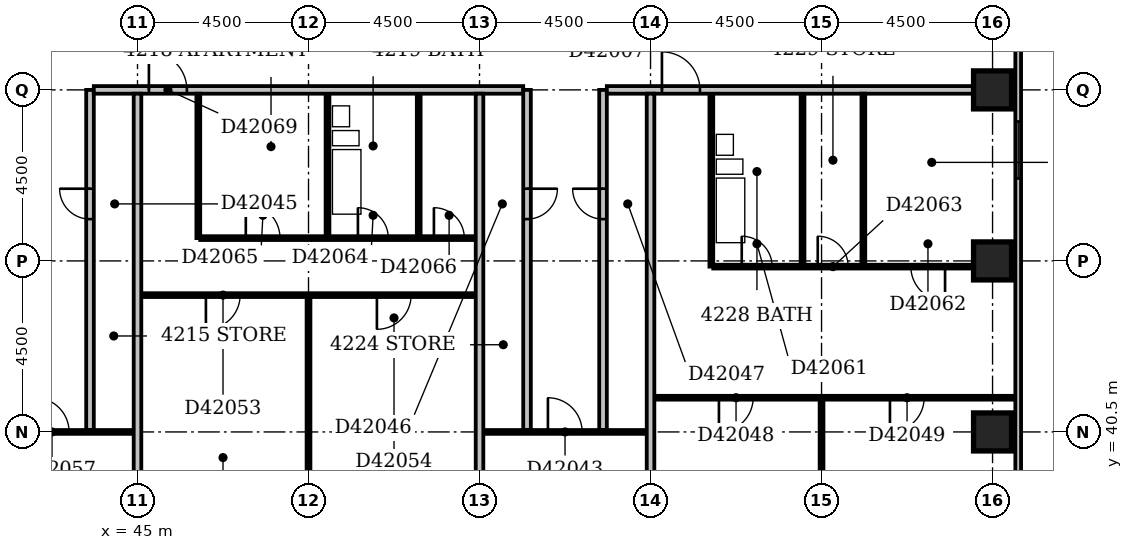
"""IFC4 building model, lengths in metres.
Left out: names, types, materials, properties, quantities, classifications, styles, units other than length and angle.
Written with IfcOpenShell. Run it as: python <this file> out.ifc"""

import sys

from ifc_helpers import new_model, si_unit, direction, frame, frame_2d, origin, origin_2d, place, context, subcontext, project, spatial, rectangle, extrude, element, fill, save


model = new_model("IFC4")
c1 = context("Model", 3, precision=1e-05, world=origin(), true_north=direction((0.0, 1.0)))
c2 = subcontext(c1, "Body", "Model", "MODEL_VIEW")
j1 = project(units=[si_unit("LENGTHUNIT", "METRE"), si_unit("PLANEANGLEUNIT", "RADIAN")], contexts=[c1])
p1 = place(None, origin())
s1 = spatial("IfcSite", under=j1, at=p1, CompositionType="ELEMENT")
p2 = place(p1, origin())
s2 = spatial("IfcBuilding", under=s1, at=p2, CompositionType="ELEMENT")
p3 = place(p2, frame((0.0, 0.0, 166.4)))
s3 = spatial("IfcBuildingStorey", under=s2, at=p3, CompositionType="ELEMENT", Elevation=166.4)
for number, where, z_axis, x_axis in (
    (1, (67.5, 40.5, -0.3), (0.0, 0.0, 1.0), (1.0, 0.0, 0.0)),
    (2, (67.5, 45.0, -0.3), (0.0, 0.0, 1.0), (1.0, 0.0, 0.0)),
    (3, (67.5, 49.5, -0.3), (0.0, 0.0, 1.0), (1.0, 0.0, 0.0)),
):
    element("IfcColumn", number, at=place(p3, frame(where, z_axis=z_axis, x_axis=x_axis)), inside=s3, PredefinedType="COLUMN", context=c2, shape_type="SweptSolid", body=[
        extrude(rectangle(XDim=1.0, YDim=1.0, at=origin_2d()), origin(), (0.0, 0.0, 1.0), 3.6),
    ])
p4 = place(p3, frame((68.175, 35.4, 0.0), z_axis=(0.0, 0.0, 1.0), x_axis=(0.0, 1.0, 0.0)))
e4 = element("IfcWall", 4, at=p4, inside=s3, PredefinedType="STANDARD", context=c2, shape_type="SweptSolid", body=[
    extrude(rectangle(XDim=23.85, YDim=0.15, at=frame_2d((11.925, 0.0))), origin(), (0.0, 0.0, 1.0), 2.7),
])
p5 = place(p4, frame((1.65, 0.0, 0.6)))
e5 = element("IfcOpeningElement", 5, at=p5, cuts=e4, PredefinedType="OPENING", context=c2, shape_type="SweptSolid", body=[
    extrude(rectangle(XDim=2.4, YDim=1.8, at=frame_2d((1.2, 0.9))), frame((0.0, 0.087, 0.0), z_axis=(0.0, -1.0, 0.0), x_axis=(1.0, 0.0, 0.0)), (0.0, 0.0, 1.0), 0.174),
])
p6 = place(p4, frame((11.769, 0.0, 0.6)))
e6 = element("IfcOpeningElement", 6, at=p6, cuts=e4, PredefinedType="OPENING", context=c2, shape_type="SweptSolid", body=[
    extrude(rectangle(XDim=1.5, YDim=1.8, at=frame_2d((0.75, 0.9))), frame((0.0, 0.087, 0.0), z_axis=(0.0, -1.0, 0.0), x_axis=(1.0, 0.0, 0.0)), (0.0, 0.0, 1.0), 0.174),
])
p7 = place(p4, frame((19.65, 0.0, 0.6)))
e7 = element("IfcOpeningElement", 7, at=p7, cuts=e4, PredefinedType="OPENING", context=c2, shape_type="SweptSolid", body=[
    extrude(rectangle(XDim=2.4, YDim=1.8, at=frame_2d((1.2, 0.9))), frame((0.0, 0.087, 0.0), z_axis=(0.0, -1.0, 0.0), x_axis=(1.0, 0.0, 0.0)), (0.0, 0.0, 1.0), 0.174),
])
p8 = place(p3, frame((45.0, 36.5, 0.0), z_axis=(0.0, 0.0, 1.0), x_axis=(0.0, 1.0, 0.0)))
e8 = element("IfcWall", 8, at=p8, inside=s3, PredefinedType="PARTITIONING", context=c2, shape_type="SweptSolid", body=[
    extrude(rectangle(XDim=12.9, YDim=0.2, at=frame_2d((6.45, 0.0))), origin(), (0.0, 0.0, 1.0), 2.6),
])
p9 = place(p3, frame((49.5, 36.5, 0.0), z_axis=(0.0, 0.0, 1.0), x_axis=(0.0, 1.0, 0.0)))
e9 = element("IfcWall", 9, at=p9, inside=s3, PredefinedType="PARTITIONING", context=c2, shape_type="SweptSolid", body=[
    extrude(rectangle(XDim=7.55, YDim=0.1, at=frame_2d((3.775, 0.0))), origin(), (0.0, 0.0, 1.0), 3.3),
])
p10 = place(p3, frame((54.0, 36.5, 0.0), z_axis=(0.0, 0.0, 1.0), x_axis=(0.0, 1.0, 0.0)))
e10 = element("IfcWall", 10, at=p10, inside=s3, PredefinedType="PARTITIONING", context=c2, shape_type="SweptSolid", body=[
    extrude(rectangle(XDim=12.9, YDim=0.2, at=frame_2d((6.45, 0.0))), origin(), (0.0, 0.0, 1.0), 2.6),
])
p11 = place(p3, frame((58.5, 36.5, 0.0), z_axis=(0.0, 0.0, 1.0), x_axis=(0.0, 1.0, 0.0)))
e11 = element("IfcWall", 11, at=p11, inside=s3, PredefinedType="PARTITIONING", context=c2, shape_type="SweptSolid", body=[
    extrude(rectangle(XDim=12.9, YDim=0.2, at=frame_2d((6.45, 0.0))), origin(), (0.0, 0.0, 1.0), 3.3),
])
p12 = place(p3, frame((63.0, 36.5, 0.0), z_axis=(0.0, 0.0, 1.0), x_axis=(0.0, 1.0, 0.0)))
e12 = element("IfcWall", 12, at=p12, inside=s3, PredefinedType="PARTITIONING", context=c2, shape_type="SweptSolid", body=[
    extrude(rectangle(XDim=4.85, YDim=0.1, at=frame_2d((2.425, 0.0))), origin(), (0.0, 0.0, 1.0), 2.4),
])
p13 = place(p3, frame((40.6, 40.5, 0.0), z_axis=(0.0, 0.0, 1.0), x_axis=(1.0, 0.0, 0.0)))
e13 = element("IfcWall", 13, at=p13, inside=s3, PredefinedType="PARTITIONING", context=c2, shape_type="SweptSolid", body=[
    extrude(rectangle(XDim=4.3, YDim=0.1, at=frame_2d((2.15, 0.0))), origin(), (0.0, 0.0, 1.0), 3.3),
])
p14 = place(p13, frame((1.7, 0.0, 0.0)))
e14 = element("IfcOpeningElement", 14, at=p14, cuts=e13, PredefinedType="OPENING", context=c2, shape_type="SweptSolid", body=[
    extrude(rectangle(XDim=0.9, YDim=2.1, at=frame_2d((0.45, 1.05))), frame((0.0, 0.062, 0.0), z_axis=(0.0, -1.0, 0.0), x_axis=(1.0, 0.0, 0.0)), (0.0, 0.0, 1.0), 0.124),
])
p15 = place(p3, frame((54.1, 40.5, 0.0), z_axis=(0.0, 0.0, 1.0), x_axis=(1.0, 0.0, 0.0)))
e15 = element("IfcWall", 15, at=p15, inside=s3, PredefinedType="PARTITIONING", context=c2, shape_type="SweptSolid", body=[
    extrude(rectangle(XDim=4.3, YDim=0.1, at=frame_2d((2.15, 0.0))), origin(), (0.0, 0.0, 1.0), 3.3),
])
p16 = place(p15, frame((1.7, 0.0, 0.0)))
e16 = element("IfcOpeningElement", 16, at=p16, cuts=e15, PredefinedType="OPENING", context=c2, shape_type="SweptSolid", body=[
    extrude(rectangle(XDim=0.9, YDim=2.1, at=frame_2d((0.45, 1.05))), frame((0.0, 0.062, 0.0), z_axis=(0.0, -1.0, 0.0), x_axis=(1.0, 0.0, 0.0)), (0.0, 0.0, 1.0), 0.124),
])
p17 = place(p3, frame((43.75, 40.55, 0.0), z_axis=(0.0, 0.0, 1.0), x_axis=(0.0, 1.0, 0.0)))
e17 = element("IfcWall", 17, at=p17, inside=s3, PredefinedType="PARTITIONING", context=c2, shape_type="SweptSolid", body=[
    extrude(rectangle(XDim=8.95, YDim=0.2, at=frame_2d((4.475, 0.0))), origin(), (0.0, 0.0, 1.0), 3.3),
])
p18 = place(p17, frame((5.55, 0.0, 0.0)))
e18 = element("IfcOpeningElement", 18, at=p18, cuts=e17, PredefinedType="OPENING", context=c2, shape_type="SweptSolid", body=[
    extrude(rectangle(XDim=0.8, YDim=2.1, at=frame_2d((0.4, 1.05))), frame((0.0, 0.112, 0.0), z_axis=(0.0, -1.0, 0.0), x_axis=(1.0, 0.0, 0.0)), (0.0, 0.0, 1.0), 0.224),
])
p19 = place(p3, frame((55.25, 40.55, 0.0), z_axis=(0.0, 0.0, 1.0), x_axis=(0.0, 1.0, 0.0)))
e19 = element("IfcWall", 19, at=p19, inside=s3, PredefinedType="PARTITIONING", context=c2, shape_type="SweptSolid", body=[
    extrude(rectangle(XDim=8.95, YDim=0.2, at=frame_2d((4.475, 0.0))), origin(), (0.0, 0.0, 1.0), 3.3),
])
p20 = place(p19, frame((5.55, 0.0, 0.0)))
e20 = element("IfcOpeningElement", 20, at=p20, cuts=e19, PredefinedType="OPENING", context=c2, shape_type="SweptSolid", body=[
    extrude(rectangle(XDim=0.8, YDim=2.1, at=frame_2d((0.4, 1.05))), frame((0.0, 0.112, 0.0), z_axis=(0.0, -1.0, 0.0), x_axis=(1.0, 0.0, 0.0)), (0.0, 0.0, 1.0), 0.224),
])
p21 = place(p3, frame((57.25, 40.55, 0.0), z_axis=(0.0, 0.0, 1.0), x_axis=(0.0, 1.0, 0.0)))
e21 = element("IfcWall", 21, at=p21, inside=s3, PredefinedType="PARTITIONING", context=c2, shape_type="SweptSolid", body=[
    extrude(rectangle(XDim=8.95, YDim=0.2, at=frame_2d((4.475, 0.0))), origin(), (0.0, 0.0, 1.0), 3.3),
])
p22 = place(p21, frame((5.55, 0.0, 0.0)))
e22 = element("IfcOpeningElement", 22, at=p22, cuts=e21, PredefinedType="OPENING", context=c2, shape_type="SweptSolid", body=[
    extrude(rectangle(XDim=0.8, YDim=2.1, at=frame_2d((0.4, 1.05))), frame((0.0, 0.112, 0.0), z_axis=(0.0, -1.0, 0.0), x_axis=(1.0, 0.0, 0.0)), (0.0, 0.0, 1.0), 0.224),
])
p23 = place(p3, frame((58.6, 41.4, 0.0), z_axis=(0.0, 0.0, 1.0), x_axis=(1.0, 0.0, 0.0)))
e23 = element("IfcWall", 23, at=p23, inside=s3, PredefinedType="PARTITIONING", context=c2, shape_type="SweptSolid", body=[
    extrude(rectangle(XDim=9.5, YDim=0.1, at=frame_2d((4.75, 0.0))), origin(), (0.0, 0.0, 1.0), 3.3),
])
p24 = place(p23, frame((1.7, 0.0, 0.0)))
e24 = element("IfcOpeningElement", 24, at=p24, cuts=e23, PredefinedType="OPENING", context=c2, shape_type="SweptSolid", body=[
    extrude(rectangle(XDim=0.9, YDim=2.1, at=frame_2d((0.45, 1.05))), frame((0.0, 0.062, 0.0), z_axis=(0.0, -1.0, 0.0), x_axis=(1.0, 0.0, 0.0)), (0.0, 0.0, 1.0), 0.124),
])
p25 = place(p23, frame((6.2, 0.0, 0.0)))
e25 = element("IfcOpeningElement", 25, at=p25, cuts=e23, PredefinedType="OPENING", context=c2, shape_type="SweptSolid", body=[
    extrude(rectangle(XDim=0.9, YDim=2.1, at=frame_2d((0.45, 1.05))), frame((0.0, 0.062, 0.0), z_axis=(0.0, -1.0, 0.0), x_axis=(1.0, 0.0, 0.0)), (0.0, 0.0, 1.0), 0.124),
])
p26 = place(p3, frame((45.1, 44.1, 0.0), z_axis=(0.0, 0.0, 1.0), x_axis=(1.0, 0.0, 0.0)))
e26 = element("IfcWall", 26, at=p26, inside=s3, PredefinedType="PARTITIONING", context=c2, shape_type="SweptSolid", body=[
    extrude(rectangle(XDim=8.8, YDim=0.1, at=frame_2d((4.4, 0.0))), origin(), (0.0, 0.0, 1.0), 3.3),
])
p27 = place(p26, frame((1.7, 0.0, 0.0)))
e27 = element("IfcOpeningElement", 27, at=p27, cuts=e26, PredefinedType="OPENING", context=c2, shape_type="SweptSolid", body=[
    extrude(rectangle(XDim=0.9, YDim=2.1, at=frame_2d((0.45, 1.05))), frame((0.0, 0.062, 0.0), z_axis=(0.0, -1.0, 0.0), x_axis=(1.0, 0.0, 0.0)), (0.0, 0.0, 1.0), 0.124),
])
p28 = place(p26, frame((6.2, 0.0, 0.0)))
e28 = element("IfcOpeningElement", 28, at=p28, cuts=e26, PredefinedType="OPENING", context=c2, shape_type="SweptSolid", body=[
    extrude(rectangle(XDim=0.9, YDim=2.1, at=frame_2d((0.45, 1.05))), frame((0.0, 0.062, 0.0), z_axis=(0.0, -1.0, 0.0), x_axis=(1.0, 0.0, 0.0)), (0.0, 0.0, 1.0), 0.124),
])
p29 = place(p3, frame((60.1, 44.85, 0.0), z_axis=(0.0, 0.0, 1.0), x_axis=(0.0, 1.0, 0.0)))
e29 = element("IfcWall", 29, at=p29, inside=s3, PredefinedType="PLUMBINGWALL", context=c2, shape_type="SweptSolid", body=[
    extrude(rectangle(XDim=4.55, YDim=0.1, at=frame_2d((2.275, 0.0))), origin(), (0.0, 0.0, 1.0), 3.3),
])
p30 = place(p3, frame((60.15, 44.85, 0.0), z_axis=(0.0, 0.0, 1.0), x_axis=(1.0, 0.0, 0.0)))
e30 = element("IfcWall", 30, at=p30, inside=s3, PredefinedType="PARTITIONING", context=c2, shape_type="SweptSolid", body=[
    extrude(rectangle(XDim=6.85, YDim=0.1, at=frame_2d((3.425, 0.0))), origin(), (0.0, 0.0, 1.0), 3.3),
])
p31 = place(p30, frame((0.75, 0.0, 0.0)))
e31 = element("IfcOpeningElement", 31, at=p31, cuts=e30, PredefinedType="OPENING", context=c2, shape_type="SweptSolid", body=[
    extrude(rectangle(XDim=0.8, YDim=2.1, at=frame_2d((0.4, 1.05))), frame((0.0, 0.062, 0.0), z_axis=(0.0, -1.0, 0.0), x_axis=(1.0, 0.0, 0.0)), (0.0, 0.0, 1.0), 0.124),
])
p32 = place(p30, frame((5.2, 0.0, 0.0)))
e32 = element("IfcOpeningElement", 32, at=p32, cuts=e30, PredefinedType="OPENING", context=c2, shape_type="SweptSolid", body=[
    extrude(rectangle(XDim=0.9, YDim=2.1, at=frame_2d((0.45, 1.05))), frame((0.0, 0.062, 0.0), z_axis=(0.0, -1.0, 0.0), x_axis=(1.0, 0.0, 0.0)), (0.0, 0.0, 1.0), 0.124),
])
p33 = place(p30, frame((2.75, 0.0, 0.0)))
e33 = element("IfcOpeningElement", 33, at=p33, cuts=e30, PredefinedType="OPENING", context=c2, shape_type="SweptSolid", body=[
    extrude(rectangle(XDim=0.8, YDim=2.1, at=frame_2d((0.4, 1.05))), frame((0.0, 0.062, 0.0), z_axis=(0.0, -1.0, 0.0), x_axis=(1.0, 0.0, 0.0)), (0.0, 0.0, 1.0), 0.124),
])
p34 = place(p3, frame((62.5, 44.9, 0.0), z_axis=(0.0, 0.0, 1.0), x_axis=(0.0, 1.0, 0.0)))
e34 = element("IfcWall", 34, at=p34, inside=s3, PredefinedType="PLUMBINGWALL", context=c2, shape_type="SweptSolid", body=[
    extrude(rectangle(XDim=4.5, YDim=0.1, at=frame_2d((2.25, 0.0))), origin(), (0.0, 0.0, 1.0), 2.4),
])
p35 = place(p3, frame((64.1, 44.9, 0.0), z_axis=(0.0, 0.0, 1.0), x_axis=(0.0, 1.0, 0.0)))
e35 = element("IfcWall", 35, at=p35, inside=s3, PredefinedType="PARTITIONING", context=c2, shape_type="SweptSolid", body=[
    extrude(rectangle(XDim=4.5, YDim=0.1, at=frame_2d((2.25, 0.0))), origin(), (0.0, 0.0, 1.0), 3.3),
])
p36 = place(p3, frame((46.6, 45.6, 0.0), z_axis=(0.0, 0.0, 1.0), x_axis=(0.0, 1.0, 0.0)))
e36 = element("IfcWall", 36, at=p36, inside=s3, PredefinedType="PARTITIONING", context=c2, shape_type="SweptSolid", body=[
    extrude(rectangle(XDim=3.8, YDim=0.1, at=frame_2d((1.9, 0.0))), origin(), (0.0, 0.0, 1.0), 3.3),
])
p37 = place(p3, frame((46.65, 45.6, 0.0), z_axis=(0.0, 0.0, 1.0), x_axis=(1.0, 0.0, 0.0)))
e37 = element("IfcWall", 37, at=p37, inside=s3, PredefinedType="PARTITIONING", context=c2, shape_type="SweptSolid", body=[
    extrude(rectangle(XDim=7.25, YDim=0.1, at=frame_2d((3.625, 0.0))), origin(), (0.0, 0.0, 1.0), 3.3),
])
p38 = place(p37, frame((4.15, 0.0, 0.0)))
e38 = element("IfcOpeningElement", 38, at=p38, cuts=e37, PredefinedType="OPENING", context=c2, shape_type="SweptSolid", body=[
    extrude(rectangle(XDim=0.8, YDim=2.1, at=frame_2d((0.4, 1.05))), frame((0.0, 0.062, 0.0), z_axis=(0.0, -1.0, 0.0), x_axis=(1.0, 0.0, 0.0)), (0.0, 0.0, 1.0), 0.124),
])
p39 = place(p37, frame((1.2, 0.0, 0.0)))
e39 = element("IfcOpeningElement", 39, at=p39, cuts=e37, PredefinedType="OPENING", context=c2, shape_type="SweptSolid", body=[
    extrude(rectangle(XDim=0.9, YDim=2.1, at=frame_2d((0.45, 1.05))), frame((0.0, 0.062, 0.0), z_axis=(0.0, -1.0, 0.0), x_axis=(1.0, 0.0, 0.0)), (0.0, 0.0, 1.0), 0.124),
])
p40 = place(p37, frame((6.15, 0.0, 0.0)))
e40 = element("IfcOpeningElement", 40, at=p40, cuts=e37, PredefinedType="OPENING", context=c2, shape_type="SweptSolid", body=[
    extrude(rectangle(XDim=0.8, YDim=2.1, at=frame_2d((0.4, 1.05))), frame((0.0, 0.062, 0.0), z_axis=(0.0, -1.0, 0.0), x_axis=(1.0, 0.0, 0.0)), (0.0, 0.0, 1.0), 0.124),
])
for number, where, z_axis, x_axis in (
    (41, (50.0, 45.65, 0.0), (0.0, 0.0, 1.0), (0.0, 1.0, 0.0)),
    (42, (52.4, 45.65, 0.0), (0.0, 0.0, 1.0), (0.0, 1.0, 0.0)),
):
    element("IfcWall", number, at=place(p3, frame(where, z_axis=z_axis, x_axis=x_axis)), inside=s3, PredefinedType="PLUMBINGWALL", context=c2, shape_type="SweptSolid", body=[
        extrude(rectangle(XDim=3.75, YDim=0.1, at=frame_2d((1.875, 0.0))), origin(), (0.0, 0.0, 1.0), 3.3),
    ])
p41 = place(p3, frame((43.85, 49.5, 0.0), z_axis=(0.0, 0.0, 1.0), x_axis=(1.0, 0.0, 0.0)))
e43 = element("IfcWall", 43, at=p41, inside=s3, PredefinedType="PARTITIONING", context=c2, shape_type="SweptSolid", body=[
    extrude(rectangle(XDim=11.3, YDim=0.2, at=frame_2d((5.65, 0.0))), origin(), (0.0, 0.0, 1.0), 3.3),
])
p42 = place(p41, frame((1.45, 0.0, 0.0)))
e44 = element("IfcOpeningElement", 44, at=p42, cuts=e43, PredefinedType="OPENING", context=c2, shape_type="SweptSolid", body=[
    extrude(rectangle(XDim=1.0, YDim=2.1, at=frame_2d((0.5, 1.05))), frame((0.0, 0.112, 0.0), z_axis=(0.0, -1.0, 0.0), x_axis=(1.0, 0.0, 0.0)), (0.0, 0.0, 1.0), 0.224),
])
p43 = place(p3, frame((57.35, 49.5, 0.0), z_axis=(0.0, 0.0, 1.0), x_axis=(1.0, 0.0, 0.0)))
e45 = element("IfcWall", 45, at=p43, inside=s3, PredefinedType="PARTITIONING", context=c2, shape_type="SweptSolid", body=[
    extrude(rectangle(XDim=9.65, YDim=0.2, at=frame_2d((4.825, 0.0))), origin(), (0.0, 0.0, 1.0), 3.3),
])
p44 = place(p43, frame((1.45, 0.0, 0.0)))
e46 = element("IfcOpeningElement", 46, at=p44, cuts=e45, PredefinedType="OPENING", context=c2, shape_type="SweptSolid", body=[
    extrude(rectangle(XDim=1.0, YDim=2.1, at=frame_2d((0.5, 1.05))), frame((0.0, 0.112, 0.0), z_axis=(0.0, -1.0, 0.0), x_axis=(1.0, 0.0, 0.0)), (0.0, 0.0, 1.0), 0.224),
])
p45 = place(p6, origin())
e47 = element("IfcWindow", 47, at=p45, inside=s3, PartitioningType="SINGLE_PANEL", PredefinedType="WINDOW", context=c2, shape_type="SweptSolid", body=[
    extrude(rectangle(XDim=1.5, YDim=1.8, at=frame_2d((0.75, 0.9))), frame((0.0, 0.03, 0.0), z_axis=(0.0, -1.0, 0.0), x_axis=(1.0, 0.0, 0.0)), (0.0, 0.0, 1.0), 0.06),
])
fill(e6, e47)
p46 = place(p14, origin())
e48 = element("IfcDoor", 48, at=p46, inside=s3, OperationType="SINGLE_SWING_LEFT", PredefinedType="DOOR", context=c2, shape_type="SweptSolid", body=[
    extrude(rectangle(XDim=0.9, YDim=2.1, at=frame_2d((0.45, 1.05))), frame((0.0, 0.025, 0.0), z_axis=(0.0, -1.0, 0.0), x_axis=(1.0, 0.0, 0.0)), (0.0, 0.0, 1.0), 0.05),
])
fill(e14, e48)
p47 = place(p16, origin())
e49 = element("IfcDoor", 49, at=p47, inside=s3, OperationType="SINGLE_SWING_LEFT", PredefinedType="DOOR", context=c2, shape_type="SweptSolid", body=[
    extrude(rectangle(XDim=0.9, YDim=2.1, at=frame_2d((0.45, 1.05))), frame((0.0, 0.025, 0.0), z_axis=(0.0, -1.0, 0.0), x_axis=(1.0, 0.0, 0.0)), (0.0, 0.0, 1.0), 0.05),
])
fill(e16, e49)
p48 = place(p18, frame((0.8, 0.0, 0.0), z_axis=(0.0, 0.0, 1.0), x_axis=(-1.0, 0.0, 0.0)))
e50 = element("IfcDoor", 50, at=p48, inside=s3, OperationType="SINGLE_SWING_LEFT", PredefinedType="DOOR", context=c2, shape_type="SweptSolid", body=[
    extrude(rectangle(XDim=0.8, YDim=2.1, at=frame_2d((0.4, 1.05))), frame((0.0, 0.025, 0.0), z_axis=(0.0, -1.0, 0.0), x_axis=(1.0, 0.0, 0.0)), (0.0, 0.0, 1.0), 0.05),
])
fill(e18, e50)
p49 = place(p20, origin())
e51 = element("IfcDoor", 51, at=p49, inside=s3, OperationType="SINGLE_SWING_RIGHT", PredefinedType="DOOR", context=c2, shape_type="SweptSolid", body=[
    extrude(rectangle(XDim=0.8, YDim=2.1, at=frame_2d((0.4, 1.05))), frame((0.0, 0.025, 0.0), z_axis=(0.0, -1.0, 0.0), x_axis=(1.0, 0.0, 0.0)), (0.0, 0.0, 1.0), 0.05),
])
fill(e20, e51)
p50 = place(p22, frame((0.8, 0.0, 0.0), z_axis=(0.0, 0.0, 1.0), x_axis=(-1.0, 0.0, 0.0)))
e52 = element("IfcDoor", 52, at=p50, inside=s3, OperationType="SINGLE_SWING_LEFT", PredefinedType="DOOR", context=c2, shape_type="SweptSolid", body=[
    extrude(rectangle(XDim=0.8, YDim=2.1, at=frame_2d((0.4, 1.05))), frame((0.0, 0.025, 0.0), z_axis=(0.0, -1.0, 0.0), x_axis=(1.0, 0.0, 0.0)), (0.0, 0.0, 1.0), 0.05),
])
fill(e22, e52)
p51 = place(p24, frame((0.9, 0.0, 0.0), z_axis=(0.0, 0.0, 1.0), x_axis=(-1.0, 0.0, 0.0)))
e53 = element("IfcDoor", 53, at=p51, inside=s3, OperationType="SINGLE_SWING_RIGHT", PredefinedType="DOOR", context=c2, shape_type="SweptSolid", body=[
    extrude(rectangle(XDim=0.9, YDim=2.1, at=frame_2d((0.45, 1.05))), frame((0.0, 0.025, 0.0), z_axis=(0.0, -1.0, 0.0), x_axis=(1.0, 0.0, 0.0)), (0.0, 0.0, 1.0), 0.05),
])
fill(e24, e53)
p52 = place(p25, frame((0.9, 0.0, 0.0), z_axis=(0.0, 0.0, 1.0), x_axis=(-1.0, 0.0, 0.0)))
e54 = element("IfcDoor", 54, at=p52, inside=s3, OperationType="SINGLE_SWING_RIGHT", PredefinedType="DOOR", context=c2, shape_type="SweptSolid", body=[
    extrude(rectangle(XDim=0.9, YDim=2.1, at=frame_2d((0.45, 1.05))), frame((0.0, 0.025, 0.0), z_axis=(0.0, -1.0, 0.0), x_axis=(1.0, 0.0, 0.0)), (0.0, 0.0, 1.0), 0.05),
])
fill(e25, e54)
p53 = place(p27, frame((0.9, 0.0, 0.0), z_axis=(0.0, 0.0, 1.0), x_axis=(-1.0, 0.0, 0.0)))
e55 = element("IfcDoor", 55, at=p53, inside=s3, OperationType="SINGLE_SWING_RIGHT", PredefinedType="DOOR", context=c2, shape_type="SweptSolid", body=[
    extrude(rectangle(XDim=0.9, YDim=2.1, at=frame_2d((0.45, 1.05))), frame((0.0, 0.025, 0.0), z_axis=(0.0, -1.0, 0.0), x_axis=(1.0, 0.0, 0.0)), (0.0, 0.0, 1.0), 0.05),
])
fill(e27, e55)
p54 = place(p28, frame((0.9, 0.0, 0.0), z_axis=(0.0, 0.0, 1.0), x_axis=(-1.0, 0.0, 0.0)))
e56 = element("IfcDoor", 56, at=p54, inside=s3, OperationType="SINGLE_SWING_RIGHT", PredefinedType="DOOR", context=c2, shape_type="SweptSolid", body=[
    extrude(rectangle(XDim=0.9, YDim=2.1, at=frame_2d((0.45, 1.05))), frame((0.0, 0.025, 0.0), z_axis=(0.0, -1.0, 0.0), x_axis=(1.0, 0.0, 0.0)), (0.0, 0.0, 1.0), 0.05),
])
fill(e28, e56)
p55 = place(p31, origin())
e57 = element("IfcDoor", 57, at=p55, inside=s3, OperationType="SINGLE_SWING_LEFT", PredefinedType="DOOR", context=c2, shape_type="SweptSolid", body=[
    extrude(rectangle(XDim=0.8, YDim=2.1, at=frame_2d((0.4, 1.05))), frame((0.0, 0.025, 0.0), z_axis=(0.0, -1.0, 0.0), x_axis=(1.0, 0.0, 0.0)), (0.0, 0.0, 1.0), 0.05),
])
fill(e31, e57)
p56 = place(p32, origin())
e58 = element("IfcDoor", 58, at=p56, inside=s3, OperationType="SINGLE_SWING_RIGHT", PredefinedType="DOOR", context=c2, shape_type="SweptSolid", body=[
    extrude(rectangle(XDim=0.9, YDim=2.1, at=frame_2d((0.45, 1.05))), frame((0.0, 0.025, 0.0), z_axis=(0.0, -1.0, 0.0), x_axis=(1.0, 0.0, 0.0)), (0.0, 0.0, 1.0), 0.05),
])
fill(e32, e58)
p57 = place(p33, origin())
e59 = element("IfcDoor", 59, at=p57, inside=s3, OperationType="SINGLE_SWING_LEFT", PredefinedType="DOOR", context=c2, shape_type="SweptSolid", body=[
    extrude(rectangle(XDim=0.8, YDim=2.1, at=frame_2d((0.4, 1.05))), frame((0.0, 0.025, 0.0), z_axis=(0.0, -1.0, 0.0), x_axis=(1.0, 0.0, 0.0)), (0.0, 0.0, 1.0), 0.05),
])
fill(e33, e59)
p58 = place(p38, origin())
e60 = element("IfcDoor", 60, at=p58, inside=s3, OperationType="SINGLE_SWING_LEFT", PredefinedType="DOOR", context=c2, shape_type="SweptSolid", body=[
    extrude(rectangle(XDim=0.8, YDim=2.1, at=frame_2d((0.4, 1.05))), frame((0.0, 0.025, 0.0), z_axis=(0.0, -1.0, 0.0), x_axis=(1.0, 0.0, 0.0)), (0.0, 0.0, 1.0), 0.05),
])
fill(e38, e60)
p59 = place(p39, origin())
e61 = element("IfcDoor", 61, at=p59, inside=s3, OperationType="SINGLE_SWING_LEFT", PredefinedType="DOOR", context=c2, shape_type="SweptSolid", body=[
    extrude(rectangle(XDim=0.9, YDim=2.1, at=frame_2d((0.45, 1.05))), frame((0.0, 0.025, 0.0), z_axis=(0.0, -1.0, 0.0), x_axis=(1.0, 0.0, 0.0)), (0.0, 0.0, 1.0), 0.05),
])
fill(e39, e61)
p60 = place(p40, origin())
e62 = element("IfcDoor", 62, at=p60, inside=s3, OperationType="SINGLE_SWING_LEFT", PredefinedType="DOOR", context=c2, shape_type="SweptSolid", body=[
    extrude(rectangle(XDim=0.8, YDim=2.1, at=frame_2d((0.4, 1.05))), frame((0.0, 0.025, 0.0), z_axis=(0.0, -1.0, 0.0), x_axis=(1.0, 0.0, 0.0)), (0.0, 0.0, 1.0), 0.05),
])
fill(e40, e62)
p61 = place(p42, origin())
e63 = element("IfcDoor", 63, at=p61, inside=s3, OperationType="SINGLE_SWING_LEFT", PredefinedType="DOOR", context=c2, shape_type="SweptSolid", body=[
    extrude(rectangle(XDim=1.0, YDim=2.1, at=frame_2d((0.5, 1.05))), frame((0.0, 0.025, 0.0), z_axis=(0.0, -1.0, 0.0), x_axis=(1.0, 0.0, 0.0)), (0.0, 0.0, 1.0), 0.05),
])
fill(e44, e63)
p62 = place(p44, origin())
e64 = element("IfcDoor", 64, at=p62, inside=s3, OperationType="SINGLE_SWING_LEFT", PredefinedType="DOOR", context=c2, shape_type="SweptSolid", body=[
    extrude(rectangle(XDim=1.0, YDim=2.1, at=frame_2d((0.5, 1.05))), frame((0.0, 0.025, 0.0), z_axis=(0.0, -1.0, 0.0), x_axis=(1.0, 0.0, 0.0)), (0.0, 0.0, 1.0), 0.05),
])
fill(e46, e64)
save(model, sys.argv[1])
